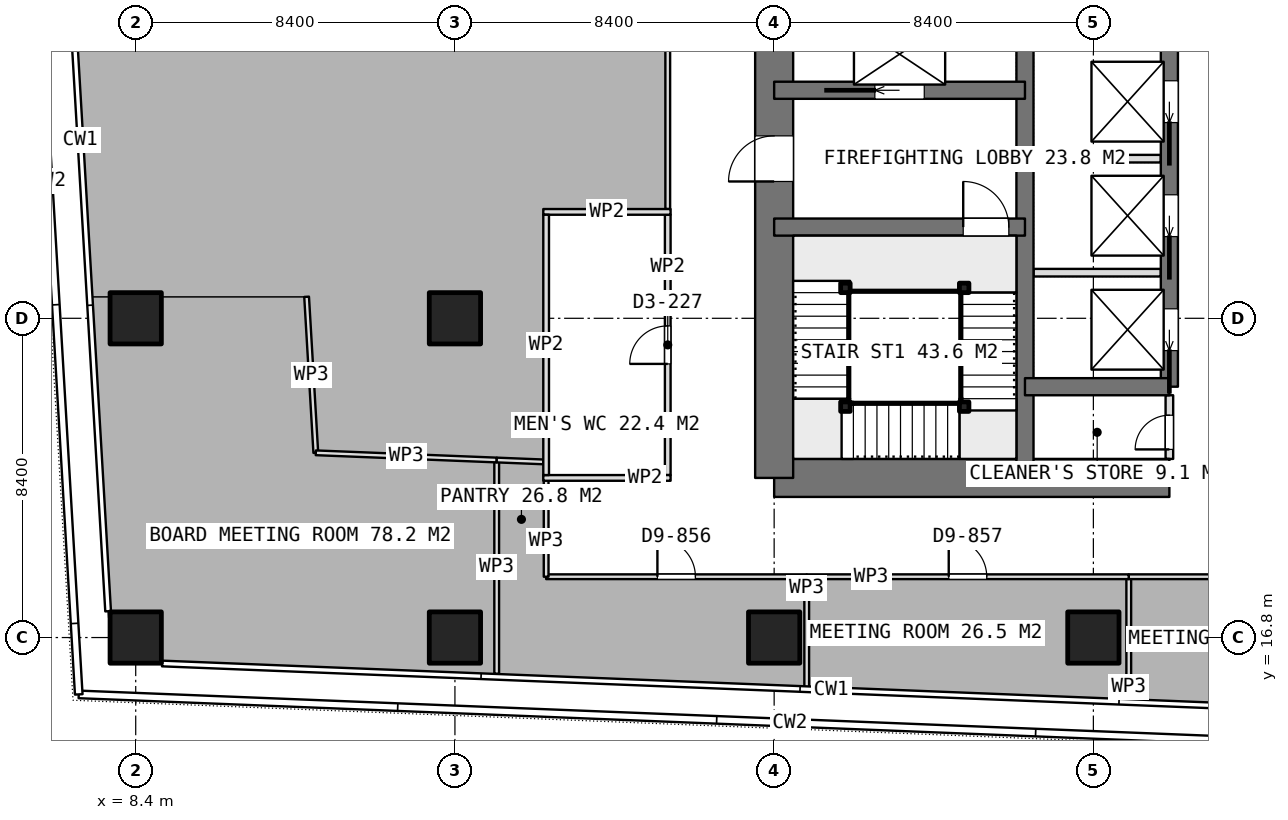
"""IFC4 building model, lengths in metres.
Left out: names, types, materials, properties, quantities, classifications, styles, units other than length and angle.
Written with IfcOpenShell. Run it as: python <this file> out.ifc"""

import sys

from ifc_helpers import new_model, si_unit, direction, frame, frame_2d, origin, origin_2d, place, context, subcontext, project, spatial, rectangle, extrude, element, fill, save


model = new_model("IFC4")
c1 = context("Model", 3, precision=1e-05, world=origin(), true_north=direction((0.0, 1.0)))
c2 = subcontext(c1, "Body", "Model", "MODEL_VIEW")
j1 = project(units=[si_unit("LENGTHUNIT", "METRE"), si_unit("PLANEANGLEUNIT", "RADIAN")], contexts=[c1])
p1 = place(None, origin())
s1 = spatial("IfcSite", under=j1, at=p1, CompositionType="ELEMENT")
p2 = place(p1, origin())
s2 = spatial("IfcBuilding", under=s1, at=p2, CompositionType="ELEMENT")
p3 = place(p2, frame((0.0, 0.0, 213.95)))
s3 = spatial("IfcBuildingStorey", under=s2, at=p3, CompositionType="ELEMENT", Elevation=213.95)
p4 = place(p3, frame((25.2, 21.0, 0.0), z_axis=(0.0, 0.0, 1.0), x_axis=(1.0, 0.0, 0.0)))
e1 = element("IfcWall", 1, at=p4, inside=s3, PredefinedType="SHEAR", context=c2, shape_type="SweptSolid", body=[
    extrude(rectangle(XDim=10.4, YDim=1.0, at=frame_2d((5.2, 0.0))), origin(), (0.0, 0.0, 1.0), 3.75),
])
p5 = place(p3, frame((25.2, 21.0, 0.0), z_axis=(0.0, 0.0, 1.0), x_axis=(0.0, 1.0, 0.0)))
e2 = element("IfcWall", 2, at=p5, inside=s3, PredefinedType="SHEAR", context=c2, shape_type="SweptSolid", body=[
    extrude(rectangle(XDim=25.2, YDim=1.0, at=frame_2d((12.6, 0.0))), origin(), (0.0, 0.0, 1.0), 3.75),
])
p6 = place(p5, frame((7.8, 0.0, 0.0)))
e3 = element("IfcOpeningElement", 3, at=p6, cuts=e2, PredefinedType="OPENING", context=c2, shape_type="SweptSolid", body=[
    extrude(rectangle(XDim=1.2, YDim=2.1, at=frame_2d((0.6, 1.05))), frame((0.0, 0.51, 0.0), z_axis=(0.0, -1.0, 0.0), x_axis=(1.0, 0.0, 0.0)), (0.0, 0.0, 1.0), 1.02),
])
p7 = place(p5, frame((14.25, 0.0, 0.0)))
e4 = element("IfcOpeningElement", 4, at=p7, cuts=e2, PredefinedType="OPENING", context=c2, shape_type="SweptSolid", body=[
    extrude(rectangle(XDim=0.9, YDim=2.1, at=frame_2d((0.45, 1.05))), frame((0.0, 0.51, 0.0), z_axis=(0.0, -1.0, 0.0), x_axis=(1.0, 0.0, 0.0)), (0.0, 0.0, 1.0), 1.02),
])
p8 = place(p5, frame((16.85, 0.0, 0.0)))
e5 = element("IfcOpeningElement", 5, at=p8, cuts=e2, PredefinedType="OPENING", context=c2, shape_type="SweptSolid", body=[
    extrude(rectangle(XDim=0.9, YDim=2.1, at=frame_2d((0.45, 1.05))), frame((0.0, 0.51, 0.0), z_axis=(0.0, -1.0, 0.0), x_axis=(1.0, 0.0, 0.0)), (0.0, 0.0, 1.0), 1.02),
])
p9 = place(p5, frame((19.025, 0.0, 0.0)))
e6 = element("IfcOpeningElement", 6, at=p9, cuts=e2, PredefinedType="OPENING", context=c2, shape_type="SweptSolid", body=[
    extrude(rectangle(XDim=1.2, YDim=2.1, at=frame_2d((0.6, 1.05))), frame((0.0, 0.51, 0.0), z_axis=(0.0, -1.0, 0.0), x_axis=(1.0, 0.0, 0.0)), (0.0, 0.0, 1.0), 1.02),
])
p10 = place(p3, frame((31.8, 21.0, 0.0), z_axis=(0.0, 0.0, 1.0), x_axis=(0.0, 1.0, 0.0)))
e7 = element("IfcWall", 7, at=p10, inside=s3, PredefinedType="SHEAR", context=c2, shape_type="SweptSolid", body=[
    extrude(rectangle(XDim=25.2, YDim=0.45, at=frame_2d((12.6, 0.0))), origin(), (0.0, 0.0, 1.0), 3.75),
])
p11 = place(p3, frame((35.6, 23.4, 0.0), z_axis=(0.0, 0.0, 1.0), x_axis=(0.0, 1.0, 0.0)))
e8 = element("IfcWall", 8, at=p11, inside=s3, PredefinedType="SHEAR", context=c2, shape_type="SweptSolid", body=[
    extrude(rectangle(XDim=18.0, YDim=0.45, at=frame_2d((9.0, 0.0))), origin(), (0.0, 0.0, 1.0), 3.75),
])
p12 = place(p11, frame((0.95, 0.0, 0.0)))
e9 = element("IfcOpeningElement", 9, at=p12, cuts=e8, PredefinedType="OPENING", context=c2, shape_type="SweptSolid", body=[
    extrude(rectangle(XDim=1.1, YDim=2.1, at=frame_2d((0.55, 1.05))), frame((0.0, 0.235, 0.0), z_axis=(0.0, -1.0, 0.0), x_axis=(1.0, 0.0, 0.0)), (0.0, 0.0, 1.0), 0.47),
])
p13 = place(p11, frame((3.95, 0.0, 0.0)))
e10 = element("IfcOpeningElement", 10, at=p13, cuts=e8, PredefinedType="OPENING", context=c2, shape_type="SweptSolid", body=[
    extrude(rectangle(XDim=1.1, YDim=2.1, at=frame_2d((0.55, 1.05))), frame((0.0, 0.235, 0.0), z_axis=(0.0, -1.0, 0.0), x_axis=(1.0, 0.0, 0.0)), (0.0, 0.0, 1.0), 0.47),
])
p14 = place(p11, frame((6.95, 0.0, 0.0)))
e11 = element("IfcOpeningElement", 11, at=p14, cuts=e8, PredefinedType="OPENING", context=c2, shape_type="SweptSolid", body=[
    extrude(rectangle(XDim=1.1, YDim=2.1, at=frame_2d((0.55, 1.05))), frame((0.0, 0.235, 0.0), z_axis=(0.0, -1.0, 0.0), x_axis=(1.0, 0.0, 0.0)), (0.0, 0.0, 1.0), 0.47),
])
p15 = place(p11, frame((9.95, 0.0, 0.0)))
e12 = element("IfcOpeningElement", 12, at=p15, cuts=e8, PredefinedType="OPENING", context=c2, shape_type="SweptSolid", body=[
    extrude(rectangle(XDim=1.1, YDim=2.1, at=frame_2d((0.55, 1.05))), frame((0.0, 0.235, 0.0), z_axis=(0.0, -1.0, 0.0), x_axis=(1.0, 0.0, 0.0)), (0.0, 0.0, 1.0), 0.47),
])
p16 = place(p11, frame((12.95, 0.0, 0.0)))
e13 = element("IfcOpeningElement", 13, at=p16, cuts=e8, PredefinedType="OPENING", context=c2, shape_type="SweptSolid", body=[
    extrude(rectangle(XDim=1.1, YDim=2.1, at=frame_2d((0.55, 1.05))), frame((0.0, 0.235, 0.0), z_axis=(0.0, -1.0, 0.0), x_axis=(1.0, 0.0, 0.0)), (0.0, 0.0, 1.0), 0.47),
])
p17 = place(p11, frame((15.95, 0.0, 0.0)))
e14 = element("IfcOpeningElement", 14, at=p17, cuts=e8, PredefinedType="OPENING", context=c2, shape_type="SweptSolid", body=[
    extrude(rectangle(XDim=1.1, YDim=2.1, at=frame_2d((0.55, 1.05))), frame((0.0, 0.235, 0.0), z_axis=(0.0, -1.0, 0.0), x_axis=(1.0, 0.0, 0.0)), (0.0, 0.0, 1.0), 0.47),
])
p18 = place(p3, frame((31.8, 23.4, 0.0), z_axis=(0.0, 0.0, 1.0), x_axis=(1.0, 0.0, 0.0)))
e15 = element("IfcWall", 15, at=p18, inside=s3, PredefinedType="SHEAR", context=c2, shape_type="SweptSolid", body=[
    extrude(rectangle(XDim=3.8, YDim=0.45, at=frame_2d((1.9, 0.0))), origin(), (0.0, 0.0, 1.0), 3.75),
])
p19 = place(p3, frame((25.2, 27.6, 0.0), z_axis=(0.0, 0.0, 1.0), x_axis=(1.0, 0.0, 0.0)))
e16 = element("IfcWall", 16, at=p19, inside=s3, PredefinedType="SHEAR", context=c2, shape_type="SweptSolid", body=[
    extrude(rectangle(XDim=6.6, YDim=0.45, at=frame_2d((3.3, 0.0))), origin(), (0.0, 0.0, 1.0), 3.75),
])
p20 = place(p19, frame((4.975, 0.0, 0.0)))
e17 = element("IfcOpeningElement", 17, at=p20, cuts=e16, PredefinedType="OPENING", context=c2, shape_type="SweptSolid", body=[
    extrude(rectangle(XDim=1.2, YDim=2.1, at=frame_2d((0.6, 1.05))), frame((0.0, 0.235, 0.0), z_axis=(0.0, -1.0, 0.0), x_axis=(1.0, 0.0, 0.0)), (0.0, 0.0, 1.0), 0.47),
])
p21 = place(p3, frame((25.2, 31.2, 0.0), z_axis=(0.0, 0.0, 1.0), x_axis=(1.0, 0.0, 0.0)))
e18 = element("IfcWall", 18, at=p21, inside=s3, PredefinedType="SHEAR", context=c2, shape_type="SweptSolid", body=[
    extrude(rectangle(XDim=6.6, YDim=0.45, at=frame_2d((3.3, 0.0))), origin(), (0.0, 0.0, 1.0), 3.75),
])
p22 = place(p21, frame((2.65, 0.0, 0.0)))
e19 = element("IfcOpeningElement", 19, at=p22, cuts=e18, PredefinedType="OPENING", context=c2, shape_type="SweptSolid", body=[
    extrude(rectangle(XDim=1.3, YDim=2.1, at=frame_2d((0.65, 1.05))), frame((0.0, 0.235, 0.0), z_axis=(0.0, -1.0, 0.0), x_axis=(1.0, 0.0, 0.0)), (0.0, 0.0, 1.0), 0.47),
])
for number, where, z_axis, x_axis in (
    (20, (8.4, 16.8, 0.0), (0.0, 0.0, 1.0), (1.0, 0.0, 0.0)),
    (21, (8.4, 25.2, 0.0), (0.0, 0.0, 1.0), (1.0, 0.0, 0.0)),
    (22, (16.8, 16.8, 0.0), (0.0, 0.0, 1.0), (1.0, 0.0, 0.0)),
    (23, (16.8, 25.2, 0.0), (0.0, 0.0, 1.0), (1.0, 0.0, 0.0)),
    (24, (25.2, 16.8, 0.0), (0.0, 0.0, 1.0), (1.0, 0.0, 0.0)),
    (25, (33.6, 16.8, 0.0), (0.0, 0.0, 1.0), (1.0, 0.0, 0.0)),
):
    element("IfcColumn", number, at=place(p3, frame(where, z_axis=z_axis, x_axis=x_axis)), inside=s3, PredefinedType="COLUMN", context=c2, shape_type="SweptSolid", body=[
        extrude(rectangle(XDim=1.35, YDim=1.35, at=origin_2d()), origin(), (0.0, 0.0, 1.0), 3.75),
    ])
for number, where, z_axis, x_axis in (
    (26, (32.025, 26.4, 0.0), (0.0, 0.0, 1.0), (1.0, 0.0, 0.0)),
    (27, (32.025, 29.4, 0.0), (0.0, 0.0, 1.0), (1.0, 0.0, 0.0)),
):
    element("IfcWall", number, at=place(p3, frame(where, z_axis=z_axis, x_axis=x_axis)), inside=s3, PredefinedType="PARTITIONING", context=c2, shape_type="SweptSolid", body=[
        extrude(rectangle(XDim=3.35, YDim=0.2, at=frame_2d((1.675, 0.0))), origin(), (0.0, 0.0, 1.0), 3.5),
    ])
p23 = place(p3, frame((35.6, 21.5, 0.0), z_axis=(0.0, 0.0, 1.0), x_axis=(0.0, 1.0, 0.0)))
e28 = element("IfcWall", 28, at=p23, inside=s3, PredefinedType="PARTITIONING", context=c2, shape_type="SweptSolid", body=[
    extrude(rectangle(XDim=1.675, YDim=0.2, at=frame_2d((0.837, 0.0))), origin(), (0.0, 0.0, 1.0), 3.5),
])
p24 = place(p23, frame((0.25, 0.0, 0.0)))
e29 = element("IfcOpeningElement", 29, at=p24, cuts=e28, PredefinedType="OPENING", context=c2, shape_type="SweptSolid", body=[
    extrude(rectangle(XDim=0.9, YDim=2.1, at=frame_2d((0.45, 1.05))), frame((0.0, 0.11, 0.0), z_axis=(0.0, -1.0, 0.0), x_axis=(1.0, 0.0, 0.0)), (0.0, 0.0, 1.0), 0.22),
])
for number, where, z_axis, x_axis in (
    (30, (19.125, 21.0, 0.0), (0.0, 0.0, 1.0), (1.0, 0.0, 0.0)),
    (31, (19.125, 28.0, 0.0), (0.0, 0.0, 1.0), (1.0, 0.0, 0.0)),
):
    element("IfcWall", number, at=place(p3, frame(where, z_axis=z_axis, x_axis=x_axis)), inside=s3, PredefinedType="PARTITIONING", context=c2, shape_type="SweptSolid", body=[
        extrude(rectangle(XDim=3.35, YDim=0.15, at=frame_2d((1.675, 0.0))), origin(), (0.0, 0.0, 1.0), 3.5),
    ])
p25 = place(p3, frame((19.2, 21.075, 0.0), z_axis=(0.0, 0.0, 1.0), x_axis=(0.0, 1.0, 0.0)))
e32 = element("IfcWall", 32, at=p25, inside=s3, PredefinedType="PARTITIONING", context=c2, shape_type="SweptSolid", body=[
    extrude(rectangle(XDim=6.85, YDim=0.15, at=frame_2d((3.425, 0.0))), origin(), (0.0, 0.0, 1.0), 3.5),
])
p26 = place(p3, frame((22.4, 21.075, 0.0), z_axis=(0.0, 0.0, 1.0), x_axis=(0.0, 1.0, 0.0)))
e33 = element("IfcWall", 33, at=p26, inside=s3, PredefinedType="PARTITIONING", context=c2, shape_type="SweptSolid", body=[
    extrude(rectangle(XDim=6.85, YDim=0.15, at=frame_2d((3.425, 0.0))), origin(), (0.0, 0.0, 1.0), 3.5),
])
p27 = place(p26, frame((2.925, 0.0, 0.0)))
e34 = element("IfcOpeningElement", 34, at=p27, cuts=e33, PredefinedType="OPENING", context=c2, shape_type="SweptSolid", body=[
    extrude(rectangle(XDim=1.0, YDim=2.1, at=frame_2d((0.5, 1.05))), frame((0.0, 0.085, 0.0), z_axis=(0.0, -1.0, 0.0), x_axis=(1.0, 0.0, 0.0)), (0.0, 0.0, 1.0), 0.17),
])
p28 = place(p3, frame((34.531, 15.182, 0.0), z_axis=(0.0, 0.0, 1.0), x_axis=(0.0, 1.0, 0.0)))
e35 = element("IfcWall", 35, at=p28, inside=s3, PredefinedType="PARTITIONING", context=c2, shape_type="SweptSolid", body=[
    extrude(rectangle(XDim=3.218, YDim=0.125, at=frame_2d((1.609, 0.0))), origin(), (0.0, 0.0, 1.0), 3.5),
])
p29 = place(p3, frame((34.531, 18.4, 0.0), z_axis=(0.0, 0.0, 1.0), x_axis=(1.0, 0.0, 0.0)))
e36 = element("IfcWall", 36, at=p29, inside=s3, PredefinedType="PARTITIONING", context=c2, shape_type="SweptSolid", body=[
    extrude(rectangle(XDim=8.292, YDim=0.125, at=frame_2d((4.146, 0.0))), origin(), (0.0, 0.0, 1.0), 3.5),
])
p30 = place(p29, frame((3.646, 0.0, 0.0)))
e37 = element("IfcOpeningElement", 37, at=p30, cuts=e36, PredefinedType="OPENING", context=c2, shape_type="SweptSolid", body=[
    extrude(rectangle(XDim=1.0, YDim=2.1, at=frame_2d((0.5, 1.05))), frame((0.0, 0.073, 0.0), z_axis=(0.0, -1.0, 0.0), x_axis=(1.0, 0.0, 0.0)), (0.0, 0.0, 1.0), 0.145),
])
p31 = place(p3, frame((17.899, 21.471, 0.0), z_axis=(0.0, 0.0, 1.0), x_axis=(0.0, -1.0, 0.0)))
e38 = element("IfcWall", 38, at=p31, inside=s3, PredefinedType="PARTITIONING", context=c2, shape_type="SweptSolid", body=[
    extrude(rectangle(XDim=5.625, YDim=0.125, at=frame_2d((2.812, 0.0))), origin(), (0.0, 0.0, 1.0), 3.5),
])
p32 = place(p3, frame((12.897, 25.766, 0.0), z_axis=(0.0, 0.0, 1.0), x_axis=(0.058833387196, -0.998267816045, 0.0)))
e39 = element("IfcWall", 39, at=p32, inside=s3, PredefinedType="PARTITIONING", context=c2, shape_type="SweptSolid", body=[
    extrude(rectangle(XDim=4.112, YDim=0.125, at=frame_2d((2.056, 0.0))), origin(), (0.0, 0.0, 1.0), 3.5),
])
p33 = place(p3, frame((13.139, 21.661, 0.0), z_axis=(0.0, 0.0, 1.0), x_axis=(0.999204801872, -0.039871843661, 0.0)))
e40 = element("IfcWall", 40, at=p33, inside=s3, PredefinedType="PARTITIONING", context=c2, shape_type="SweptSolid", body=[
    extrude(rectangle(XDim=4.764, YDim=0.125, at=frame_2d((2.382, 0.0))), origin(), (0.0, 0.0, 1.0), 3.5),
])
p34 = place(p3, frame((19.2, 18.4, 0.0), z_axis=(0.0, 0.0, 1.0), x_axis=(1.0, 0.0, 0.0)))
e41 = element("IfcWall", 41, at=p34, inside=s3, PredefinedType="PARTITIONING", context=c2, shape_type="SweptSolid", body=[
    extrude(rectangle(XDim=6.857, YDim=0.125, at=frame_2d((3.428, 0.0))), origin(), (0.0, 0.0, 1.0), 3.5),
])
p35 = place(p34, frame((2.928, 0.0, 0.0)))
e42 = element("IfcOpeningElement", 42, at=p35, cuts=e41, PredefinedType="OPENING", context=c2, shape_type="SweptSolid", body=[
    extrude(rectangle(XDim=1.0, YDim=2.1, at=frame_2d((0.5, 1.05))), frame((0.0, 0.073, 0.0), z_axis=(0.0, -1.0, 0.0), x_axis=(1.0, 0.0, 0.0)), (0.0, 0.0, 1.0), 0.145),
])
p36 = place(p3, frame((26.057, 18.4, 0.0), z_axis=(0.0, 0.0, 1.0), x_axis=(0.0, -1.0, 0.0)))
e43 = element("IfcWall", 43, at=p36, inside=s3, PredefinedType="PARTITIONING", context=c2, shape_type="SweptSolid", body=[
    extrude(rectangle(XDim=2.91, YDim=0.125, at=frame_2d((1.455, 0.0))), origin(), (0.0, 0.0, 1.0), 3.5),
])
p37 = place(p3, frame((17.9, 21.471, 0.0), z_axis=(0.0, 0.0, 1.0), x_axis=(0.999206674093, -0.039824897333, 0.0)))
e44 = element("IfcWall", 44, at=p37, inside=s3, PredefinedType="PARTITIONING", context=c2, shape_type="SweptSolid", body=[
    extrude(rectangle(XDim=1.226, YDim=0.125, at=frame_2d((0.613, 0.0))), origin(), (0.0, 0.0, 1.0), 3.5),
])
p38 = place(p3, frame((19.2, 21.075, 0.0), z_axis=(0.0, 0.0, 1.0), x_axis=(0.0, -1.0, 0.0)))
e45 = element("IfcWall", 45, at=p38, inside=s3, PredefinedType="PARTITIONING", context=c2, shape_type="SweptSolid", body=[
    extrude(rectangle(XDim=2.675, YDim=0.125, at=frame_2d((1.337, 0.0))), origin(), (0.0, 0.0, 1.0), 3.5),
])
p39 = place(p3, frame((26.058, 18.4, 0.0), z_axis=(0.0, 0.0, 1.0), x_axis=(1.0, 0.0, 0.0)))
e46 = element("IfcWall", 46, at=p39, inside=s3, PredefinedType="PARTITIONING", context=c2, shape_type="SweptSolid", body=[
    extrude(rectangle(XDim=8.472, YDim=0.125, at=frame_2d((4.236, 0.0))), origin(), (0.0, 0.0, 1.0), 3.5),
])
p40 = place(p39, frame((3.736, 0.0, 0.0)))
e47 = element("IfcOpeningElement", 47, at=p40, cuts=e46, PredefinedType="OPENING", context=c2, shape_type="SweptSolid", body=[
    extrude(rectangle(XDim=1.0, YDim=2.1, at=frame_2d((0.5, 1.05))), frame((0.0, 0.073, 0.0), z_axis=(0.0, -1.0, 0.0), x_axis=(1.0, 0.0, 0.0)), (0.0, 0.0, 1.0), 0.145),
])
p41 = place(p3, frame((22.4, 52.575, 0.0), z_axis=(0.0, 0.0, 1.0), x_axis=(0.0, -1.0, 0.0)))
e48 = element("IfcWall", 48, at=p41, inside=s3, PredefinedType="PARTITIONING", context=c2, shape_type="SweptSolid", body=[
    extrude(rectangle(XDim=24.5, YDim=0.125, at=frame_2d((12.25, 0.0))), origin(), (0.0, 0.0, 1.0), 3.5),
])
p42 = place(p41, frame((11.388, 0.0, 0.0)))
e49 = element("IfcOpeningElement", 49, at=p42, cuts=e48, PredefinedType="OPENING", context=c2, shape_type="SweptSolid", body=[
    extrude(rectangle(XDim=1.8, YDim=2.1, at=frame_2d((0.9, 1.05))), frame((0.0, 0.073, 0.0), z_axis=(0.0, -1.0, 0.0), x_axis=(1.0, 0.0, 0.0)), (0.0, 0.0, 1.0), 0.145),
])
for number, where, z_axis, x_axis in (
    (50, (30.2, 26.0, 0.0), (0.0, 0.0, 1.0), (1.0, 0.0, 0.0)),
    (51, (30.2, 22.875, 0.0), (0.0, 0.0, 1.0), (1.0, 0.0, 0.0)),
    (52, (27.075, 22.875, 0.0), (0.0, 0.0, 1.0), (1.0, 0.0, 0.0)),
    (53, (27.075, 26.0, 0.0), (0.0, 0.0, 1.0), (1.0, 0.0, 0.0)),
):
    element("IfcColumn", number, at=place(p3, frame(where, z_axis=z_axis, x_axis=x_axis)), inside=s3, PredefinedType="COLUMN", context=c2, shape_type="SweptSolid", body=[
        extrude(rectangle(XDim=0.25, YDim=0.25, at=origin_2d()), origin(), (0.0, 0.0, 1.0), 3.75),
    ])
p43 = place(p6, origin())
e54 = element("IfcDoor", 54, at=p43, inside=s3, OperationType="SINGLE_SWING_LEFT", PredefinedType="DOOR", context=c2, shape_type="SweptSolid", body=[
    extrude(rectangle(XDim=1.2, YDim=2.1, at=frame_2d((0.6, 1.05))), frame((0.0, 0.025, 0.0), z_axis=(0.0, -1.0, 0.0), x_axis=(1.0, 0.0, 0.0)), (0.0, 0.0, 1.0), 0.05),
])
fill(e3, e54)
p44 = place(p24, origin())
e55 = element("IfcDoor", 55, at=p44, inside=s3, OperationType="SINGLE_SWING_LEFT", PredefinedType="DOOR", context=c2, shape_type="SweptSolid", body=[
    extrude(rectangle(XDim=0.9, YDim=2.1, at=frame_2d((0.45, 1.05))), frame((0.0, 0.025, 0.0), z_axis=(0.0, -1.0, 0.0), x_axis=(1.0, 0.0, 0.0)), (0.0, 0.0, 1.0), 0.05),
])
fill(e29, e55)
p45 = place(p12, origin())
e56 = element("IfcDoor", 56, at=p45, inside=s3, OperationType="SLIDING_TO_LEFT", PredefinedType="USERDEFINED", context=c2, shape_type="SweptSolid", body=[
    extrude(rectangle(XDim=1.1, YDim=2.1, at=frame_2d((0.55, 1.05))), frame((0.0, 0.025, 0.0), z_axis=(0.0, -1.0, 0.0), x_axis=(1.0, 0.0, 0.0)), (0.0, 0.0, 1.0), 0.05),
])
fill(e9, e56)
p46 = place(p13, origin())
e57 = element("IfcDoor", 57, at=p46, inside=s3, OperationType="SLIDING_TO_LEFT", PredefinedType="USERDEFINED", context=c2, shape_type="SweptSolid", body=[
    extrude(rectangle(XDim=1.1, YDim=2.1, at=frame_2d((0.55, 1.05))), frame((0.0, 0.025, 0.0), z_axis=(0.0, -1.0, 0.0), x_axis=(1.0, 0.0, 0.0)), (0.0, 0.0, 1.0), 0.05),
])
fill(e10, e57)
p47 = place(p14, origin())
e58 = element("IfcDoor", 58, at=p47, inside=s3, OperationType="SLIDING_TO_LEFT", PredefinedType="USERDEFINED", context=c2, shape_type="SweptSolid", body=[
    extrude(rectangle(XDim=1.1, YDim=2.1, at=frame_2d((0.55, 1.05))), frame((0.0, 0.025, 0.0), z_axis=(0.0, -1.0, 0.0), x_axis=(1.0, 0.0, 0.0)), (0.0, 0.0, 1.0), 0.05),
])
fill(e11, e58)
p48 = place(p22, origin())
e59 = element("IfcDoor", 59, at=p48, inside=s3, OperationType="SLIDING_TO_LEFT", PredefinedType="USERDEFINED", context=c2, shape_type="SweptSolid", body=[
    extrude(rectangle(XDim=1.3, YDim=2.1, at=frame_2d((0.65, 1.05))), frame((0.0, 0.025, 0.0), z_axis=(0.0, -1.0, 0.0), x_axis=(1.0, 0.0, 0.0)), (0.0, 0.0, 1.0), 0.05),
])
fill(e19, e59)
p49 = place(p27, origin())
e60 = element("IfcDoor", 60, at=p49, inside=s3, OperationType="SINGLE_SWING_LEFT", PredefinedType="DOOR", context=c2, shape_type="SweptSolid", body=[
    extrude(rectangle(XDim=1.0, YDim=2.1, at=frame_2d((0.5, 1.05))), frame((0.0, 0.025, 0.0), z_axis=(0.0, -1.0, 0.0), x_axis=(1.0, 0.0, 0.0)), (0.0, 0.0, 1.0), 0.05),
])
fill(e34, e60)
p50 = place(p35, origin())
e61 = element("IfcDoor", 61, at=p50, inside=s3, OperationType="SINGLE_SWING_LEFT", PredefinedType="DOOR", context=c2, shape_type="SweptSolid", body=[
    extrude(rectangle(XDim=1.0, YDim=2.1, at=frame_2d((0.5, 1.05))), frame((0.0, 0.025, 0.0), z_axis=(0.0, -1.0, 0.0), x_axis=(1.0, 0.0, 0.0)), (0.0, 0.0, 1.0), 0.05),
])
fill(e42, e61)
p51 = place(p40, origin())
e62 = element("IfcDoor", 62, at=p51, inside=s3, OperationType="SINGLE_SWING_LEFT", PredefinedType="DOOR", context=c2, shape_type="SweptSolid", body=[
    extrude(rectangle(XDim=1.0, YDim=2.1, at=frame_2d((0.5, 1.05))), frame((0.0, 0.025, 0.0), z_axis=(0.0, -1.0, 0.0), x_axis=(1.0, 0.0, 0.0)), (0.0, 0.0, 1.0), 0.05),
])
fill(e47, e62)
p52 = place(p20, origin())
e63 = element("IfcDoor", 63, at=p52, inside=s3, OperationType="SINGLE_SWING_RIGHT", PredefinedType="DOOR", context=c2, shape_type="SweptSolid", body=[
    extrude(rectangle(XDim=1.2, YDim=2.1, at=frame_2d((0.6, 1.05))), frame((0.0, 0.025, 0.0), z_axis=(0.0, -1.0, 0.0), x_axis=(1.0, 0.0, 0.0)), (0.0, 0.0, 1.0), 0.05),
])
fill(e17, e63)
save(model, sys.argv[1])
